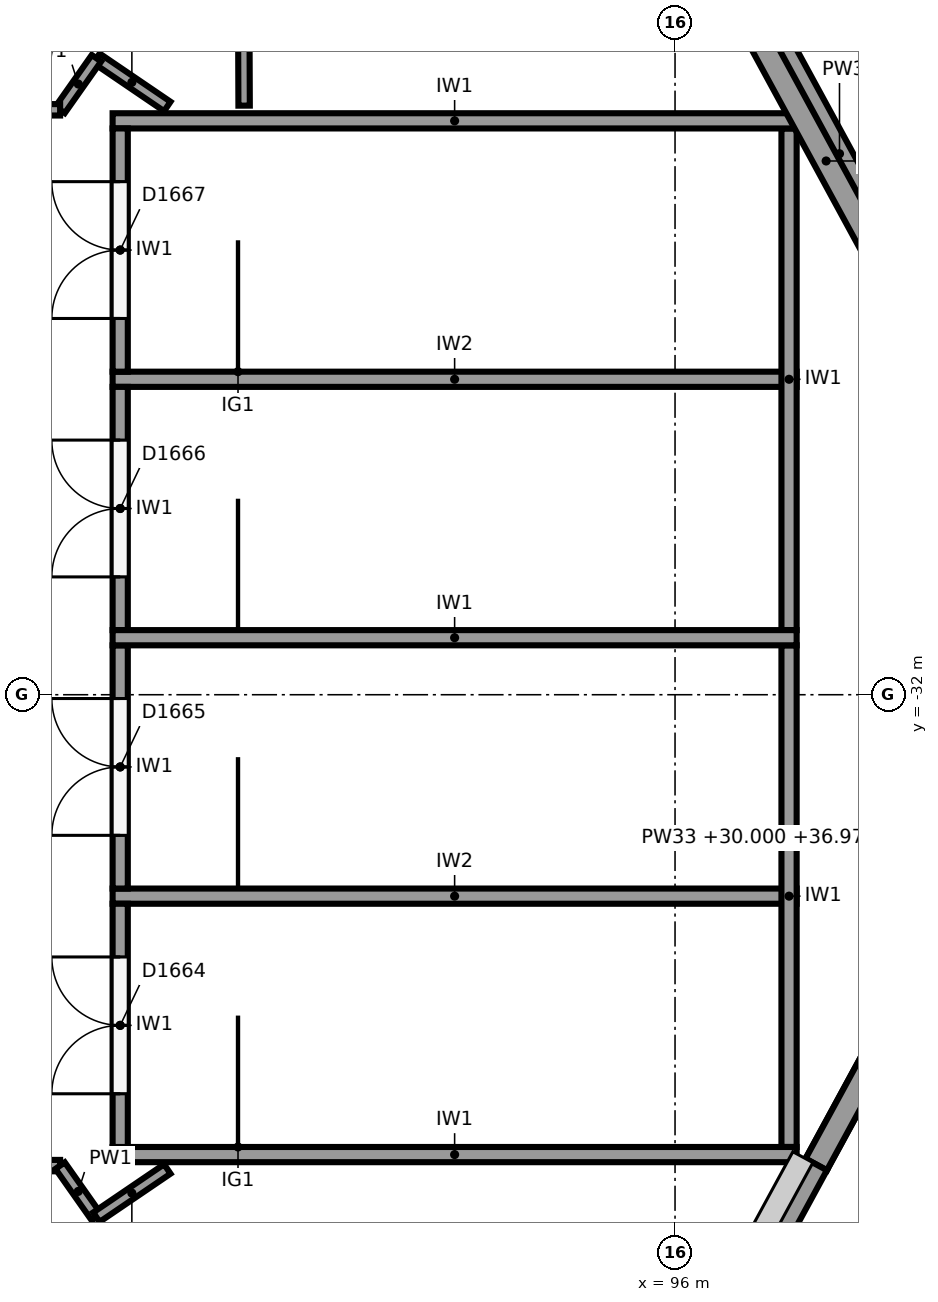
"""IFC4 building model, lengths in metres.
Left out: names, types, materials, properties, quantities, classifications, styles, units other than length and angle.
Written with IfcOpenShell. Run it as: python <this file> out.ifc"""

import sys

from ifc_helpers import new_model, si_unit, direction, frame, frame_2d, origin, place, context, subcontext, project, spatial, polyline, rectangle, outline, extrude, element, fill, save


model = new_model("IFC4")
c1 = context("Model", 3, precision=1e-05, world=origin(), true_north=direction((0.0, 1.0)))
c2 = subcontext(c1, "Body", "Model", "MODEL_VIEW")
j1 = project(units=[si_unit("LENGTHUNIT", "METRE"), si_unit("PLANEANGLEUNIT", "RADIAN")], contexts=[c1])
p1 = place(None, origin())
s1 = spatial("IfcSite", under=j1, at=p1, CompositionType="ELEMENT")
p2 = place(p1, origin())
s2 = spatial("IfcBuilding", under=s1, at=p2, CompositionType="ELEMENT")
p3 = place(p2, frame((0.0, 0.0, 24.0)))
s3 = spatial("IfcBuildingStorey", under=s2, at=p3, CompositionType="ELEMENT", Elevation=24.0)
p4 = place(p3, frame((101.337, -31.785, 0.0), z_axis=(0.0, 0.0, 1.0), x_axis=(-0.477865020076, -0.878433277255, 0.0)))
e1 = element("IfcWall", 1, at=p4, inside=s3, PredefinedType="SOLIDWALL", context=c2, shape_type="SweptSolid", body=[
    extrude(rectangle(XDim=7.28, YDim=0.32, at=frame_2d((3.64, 0.0))), origin(), (0.0, 0.0, 1.0), 6.0),
])
p5 = place(p4, frame((1.13, 0.0, 1.0)))
e2 = element("IfcOpeningElement", 2, at=p5, cuts=e1, PredefinedType="OPENING", context=c2, shape_type="SweptSolid", body=[
    extrude(rectangle(XDim=0.9, YDim=3.25, at=frame_2d((0.45, 1.625))), frame((0.0, 0.17, 0.0), z_axis=(0.0, -1.0, 0.0), x_axis=(1.0, 0.0, 0.0)), (0.0, 0.0, 1.0), 0.34),
])
p6 = place(p3, frame((101.337, -31.785, 6.0), z_axis=(0.0, 0.0, 1.0), x_axis=(-0.477865020076, -0.878433277255, 0.0)))
e3 = element("IfcWall", 3, at=p6, inside=s3, PredefinedType="SOLIDWALL", context=c2, shape_type="SweptSolid", body=[
    extrude(outline(polyline([(0.0, 0.0), (7.28, 0.0), (7.28, 6.972), (0.0, 10.451), (0.0, 0.0)])), frame((0.0, 0.16, 0.0), z_axis=(0.0, -1.0, 0.0), x_axis=(1.0, 0.0, 0.0)), (0.0, 0.0, 1.0), 0.32),
])
p7 = place(p6, frame((1.13, 0.0, 1.6)))
e4 = element("IfcOpeningElement", 4, at=p7, cuts=e3, PredefinedType="OPENING", context=c2, shape_type="SweptSolid", body=[
    extrude(rectangle(XDim=0.9, YDim=3.0, at=frame_2d((0.45, 1.5))), frame((0.0, 0.17, 0.0), z_axis=(0.0, -1.0, 0.0), x_axis=(1.0, 0.0, 0.0)), (0.0, 0.0, 1.0), 0.34),
])
p8 = place(p3, frame((97.858, -38.18, 5.65), z_axis=(0.0, 0.0, 1.0), x_axis=(-0.477871109227, -0.878429964747, 0.0)))
e5 = element("IfcWall", 5, at=p8, inside=s3, PredefinedType="SOLIDWALL", context=c2, shape_type="SweptSolid", body=[
    extrude(outline(polyline([(0.0, 0.0), (6.0, 0.0), (6.0, 4.455), (0.0, 7.322), (0.0, 0.0)])), frame((0.0, 0.16, 0.0), z_axis=(0.0, -1.0, 0.0), x_axis=(1.0, 0.0, 0.0)), (0.0, 0.0, 1.0), 0.32),
])
p9 = place(p3, frame((94.815, -19.145, 0.0), z_axis=(0.0, 0.0, 1.0), x_axis=(0.477867771117, -0.878431780691, 0.0)))
e6 = element("IfcWall", 6, at=p9, inside=s3, PredefinedType="SOLIDWALL", context=c2, shape_type="SweptSolid", body=[
    extrude(rectangle(XDim=13.28, YDim=0.32, at=frame_2d((6.64, 0.0))), origin(), (0.0, 0.0, 1.0), 6.0),
])
p10 = place(p9, frame((0.75, 0.0, 1.0)))
e7 = element("IfcOpeningElement", 7, at=p10, cuts=e6, PredefinedType="OPENING", context=c2, shape_type="SweptSolid", body=[
    extrude(rectangle(XDim=0.9, YDim=3.25, at=frame_2d((0.45, 1.625))), frame((0.0, 0.17, 0.0), z_axis=(0.0, -1.0, 0.0), x_axis=(1.0, 0.0, 0.0)), (0.0, 0.0, 1.0), 0.34),
])
p11 = place(p9, frame((2.85, 0.0, 1.0)))
e8 = element("IfcOpeningElement", 8, at=p11, cuts=e6, PredefinedType="OPENING", context=c2, shape_type="SweptSolid", body=[
    extrude(rectangle(XDim=0.9, YDim=3.25, at=frame_2d((0.45, 1.625))), frame((0.0, 0.17, 0.0), z_axis=(0.0, -1.0, 0.0), x_axis=(1.0, 0.0, 0.0)), (0.0, 0.0, 1.0), 0.34),
])
p12 = place(p9, frame((11.25, 0.0, 1.0)))
e9 = element("IfcOpeningElement", 9, at=p12, cuts=e6, PredefinedType="OPENING", context=c2, shape_type="SweptSolid", body=[
    extrude(rectangle(XDim=0.9, YDim=3.25, at=frame_2d((0.45, 1.625))), frame((0.0, 0.17, 0.0), z_axis=(0.0, -1.0, 0.0), x_axis=(1.0, 0.0, 0.0)), (0.0, 0.0, 1.0), 0.34),
])
p13 = place(p3, frame((94.991, -19.05, 6.0), z_axis=(0.0, 0.0, 1.0), x_axis=(0.477867771117, -0.878431780691, 0.0)))
e10 = element("IfcWall", 10, at=p13, inside=s3, PredefinedType="SOLIDWALL", context=c2, shape_type="SweptSolid", body=[
    extrude(outline(polyline([(0.0, 0.0), (13.28, 0.0), (13.28, 10.451), (0.0, 4.105), (0.0, 0.0)])), frame((0.0, 0.16, 0.0), z_axis=(0.0, -1.0, 0.0), x_axis=(1.0, 0.0, 0.0)), (0.0, 0.0, 1.0), 0.32),
])
p14 = place(p13, frame((2.85, 0.0, 1.6)))
e11 = element("IfcOpeningElement", 11, at=p14, cuts=e10, PredefinedType="OPENING", context=c2, shape_type="SweptSolid", body=[
    extrude(rectangle(XDim=0.9, YDim=3.0, at=frame_2d((0.45, 1.5))), frame((0.0, 0.17, 0.0), z_axis=(0.0, -1.0, 0.0), x_axis=(1.0, 0.0, 0.0)), (0.0, 0.0, 1.0), 0.34),
])
p15 = place(p13, frame((11.25, 0.0, 1.6)))
e12 = element("IfcOpeningElement", 12, at=p15, cuts=e10, PredefinedType="OPENING", context=c2, shape_type="SweptSolid", body=[
    extrude(rectangle(XDim=0.9, YDim=3.0, at=frame_2d((0.45, 1.5))), frame((0.0, 0.17, 0.0), z_axis=(0.0, -1.0, 0.0), x_axis=(1.0, 0.0, 0.0)), (0.0, 0.0, 1.0), 0.34),
])
for number, where, z_axis, x_axis in (
    (13, (97.6, -38.05, 0.0), (0.0, 0.0, 1.0), (-1.0, 0.0, 0.0)),
    (14, (97.6, -31.25, 0.0), (0.0, 0.0, 1.0), (-1.0, 0.0, 0.0)),
    (15, (97.6, -24.45, 0.0), (0.0, 0.0, 1.0), (-1.0, 0.0, 0.0)),
):
    element("IfcWall", number, at=place(p3, frame(where, z_axis=z_axis, x_axis=x_axis)), inside=s3, PredefinedType="SHEAR", context=c2, shape_type="SweptSolid", body=[
        extrude(rectangle(XDim=9.0, YDim=0.2, at=frame_2d((4.5, 0.0))), origin(), (0.0, 0.0, 1.0), 5.75),
    ])
for number, where, z_axis, x_axis in (
    (16, (97.5, -37.95, 0.0), (0.0, 0.0, 1.0), (0.0, 1.0, 0.0)),
    (17, (97.5, -31.15, 0.0), (0.0, 0.0, 1.0), (0.0, 1.0, 0.0)),
):
    element("IfcWall", number, at=place(p3, frame(where, z_axis=z_axis, x_axis=x_axis)), inside=s3, PredefinedType="SHEAR", context=c2, shape_type="SweptSolid", body=[
        extrude(rectangle(XDim=6.6, YDim=0.2, at=frame_2d((3.3, 0.0))), origin(), (0.0, 0.0, 1.0), 5.75),
    ])
for number, where, z_axis, x_axis in (
    (18, (97.6, -34.65, 0.0), (0.0, 0.0, 1.0), (-1.0, 0.0, 0.0)),
    (19, (97.6, -27.85, 0.0), (0.0, 0.0, 1.0), (-1.0, 0.0, 0.0)),
):
    element("IfcWall", number, at=place(p3, frame(where, z_axis=z_axis, x_axis=x_axis)), inside=s3, PredefinedType="SHEAR", context=c2, shape_type="SweptSolid", body=[
        extrude(rectangle(XDim=9.0, YDim=0.2, at=frame_2d((4.5, 0.0))), origin(), (0.0, 0.0, 1.0), 5.75),
    ])
p16 = place(p3, frame((88.7, -37.95, 0.0), z_axis=(0.0, 0.0, 1.0), x_axis=(0.0, 1.0, 0.0)))
e20 = element("IfcWall", 20, at=p16, inside=s3, PredefinedType="SHEAR", context=c2, shape_type="SweptSolid", body=[
    extrude(rectangle(XDim=3.2, YDim=0.2, at=frame_2d((1.6, 0.0))), origin(), (0.0, 0.0, 1.0), 5.75),
])
p17 = place(p16, frame((0.7, 0.0, 0.0)))
e21 = element("IfcOpeningElement", 21, at=p17, cuts=e20, PredefinedType="OPENING", context=c2, shape_type="SweptSolid", body=[
    extrude(rectangle(XDim=1.8, YDim=2.1, at=frame_2d((0.9, 1.05))), frame((0.0, 0.11, 0.0), z_axis=(0.0, -1.0, 0.0), x_axis=(1.0, 0.0, 0.0)), (0.0, 0.0, 1.0), 0.22),
])
p18 = place(p3, frame((88.7, -34.55, 0.0), z_axis=(0.0, 0.0, 1.0), x_axis=(0.0, 1.0, 0.0)))
e22 = element("IfcWall", 22, at=p18, inside=s3, PredefinedType="SHEAR", context=c2, shape_type="SweptSolid", body=[
    extrude(rectangle(XDim=3.2, YDim=0.2, at=frame_2d((1.6, 0.0))), origin(), (0.0, 0.0, 1.0), 5.75),
])
p19 = place(p18, frame((0.7, 0.0, 0.0)))
e23 = element("IfcOpeningElement", 23, at=p19, cuts=e22, PredefinedType="OPENING", context=c2, shape_type="SweptSolid", body=[
    extrude(rectangle(XDim=1.8, YDim=2.1, at=frame_2d((0.9, 1.05))), frame((0.0, 0.11, 0.0), z_axis=(0.0, -1.0, 0.0), x_axis=(1.0, 0.0, 0.0)), (0.0, 0.0, 1.0), 0.22),
])
p20 = place(p3, frame((88.7, -31.15, 0.0), z_axis=(0.0, 0.0, 1.0), x_axis=(0.0, 1.0, 0.0)))
e24 = element("IfcWall", 24, at=p20, inside=s3, PredefinedType="SHEAR", context=c2, shape_type="SweptSolid", body=[
    extrude(rectangle(XDim=3.2, YDim=0.2, at=frame_2d((1.6, 0.0))), origin(), (0.0, 0.0, 1.0), 5.75),
])
p21 = place(p20, frame((0.7, 0.0, 0.0)))
e25 = element("IfcOpeningElement", 25, at=p21, cuts=e24, PredefinedType="OPENING", context=c2, shape_type="SweptSolid", body=[
    extrude(rectangle(XDim=1.8, YDim=2.1, at=frame_2d((0.9, 1.05))), frame((0.0, 0.11, 0.0), z_axis=(0.0, -1.0, 0.0), x_axis=(1.0, 0.0, 0.0)), (0.0, 0.0, 1.0), 0.22),
])
p22 = place(p3, frame((88.7, -27.75, 0.0), z_axis=(0.0, 0.0, 1.0), x_axis=(0.0, 1.0, 0.0)))
e26 = element("IfcWall", 26, at=p22, inside=s3, PredefinedType="SHEAR", context=c2, shape_type="SweptSolid", body=[
    extrude(rectangle(XDim=3.2, YDim=0.2, at=frame_2d((1.6, 0.0))), origin(), (0.0, 0.0, 1.0), 5.75),
])
p23 = place(p22, frame((0.7, 0.0, 0.0)))
e27 = element("IfcOpeningElement", 27, at=p23, cuts=e26, PredefinedType="OPENING", context=c2, shape_type="SweptSolid", body=[
    extrude(rectangle(XDim=1.8, YDim=2.1, at=frame_2d((0.9, 1.05))), frame((0.0, 0.11, 0.0), z_axis=(0.0, -1.0, 0.0), x_axis=(1.0, 0.0, 0.0)), (0.0, 0.0, 1.0), 0.22),
])
p24 = place(p3, frame((90.33, -24.25, 0.0), z_axis=(0.0, 0.0, 1.0), x_axis=(-0.003805253437, 0.999992759997, 0.0)))
e28 = element("IfcWall", 28, at=p24, inside=s3, PredefinedType="PARTITIONING", context=c2, shape_type="SweptSolid", body=[
    extrude(rectangle(XDim=5.261, YDim=0.15, at=frame_2d((2.63, 0.0))), origin(), (0.0, 0.0, 1.0), 5.4),
])
p25 = place(p24, frame((2.2, 0.0, 0.0)))
e29 = element("IfcOpeningElement", 29, at=p25, cuts=e28, PredefinedType="OPENING", context=c2, shape_type="SweptSolid", body=[
    extrude(rectangle(XDim=1.0, YDim=2.1, at=frame_2d((0.5, 1.05))), frame((0.0, 0.085, 0.0), z_axis=(0.0, -1.0, 0.0), x_axis=(1.0, 0.0, 0.0)), (0.0, 0.0, 1.0), 0.17),
])
p26 = place(p3, frame((82.427, -38.195, 0.0), z_axis=(0.0, 0.0, 1.0), x_axis=(1.0, 0.0, 0.0)))
e30 = element("IfcWall", 30, at=p26, inside=s3, PredefinedType="PARTITIONING", context=c2, shape_type="SweptSolid", body=[
    extrude(rectangle(XDim=5.482, YDim=0.15, at=frame_2d((2.741, 0.0))), origin(), (0.0, 0.0, 1.0), 5.4),
])
p27 = place(p26, frame((1.85, 0.0, 0.0)))
e31 = element("IfcOpeningElement", 31, at=p27, cuts=e30, PredefinedType="OPENING", context=c2, shape_type="SweptSolid", body=[
    extrude(rectangle(XDim=1.8, YDim=2.1, at=frame_2d((0.9, 1.05))), frame((0.0, 0.085, 0.0), z_axis=(0.0, -1.0, 0.0), x_axis=(1.0, 0.0, 0.0)), (0.0, 0.0, 1.0), 0.17),
])
p28 = place(p3, frame((87.909, -38.195, 0.0), z_axis=(0.0, 0.0, 1.0), x_axis=(0.575573582652, -0.81774999294, 0.0)))
e32 = element("IfcWall", 32, at=p28, inside=s3, PredefinedType="PARTITIONING", context=c2, shape_type="SweptSolid", body=[
    extrude(rectangle(XDim=0.83, YDim=0.15, at=frame_2d((0.415, 0.0))), origin(), (0.0, 0.0, 1.0), 5.4),
])
p29 = place(p3, frame((88.387, -38.874, 0.0), z_axis=(0.0, 0.0, 1.0), x_axis=(0.827055308354, 0.562120553728, 0.0)))
e33 = element("IfcWall", 33, at=p29, inside=s3, PredefinedType="PARTITIONING", context=c2, shape_type="SweptSolid", body=[
    extrude(rectangle(XDim=1.128, YDim=0.15, at=frame_2d((0.564, 0.0))), origin(), (0.0, 0.0, 1.0), 5.4),
])
p30 = place(p3, frame((89.32, -24.26, 0.0), z_axis=(0.0, 0.0, 1.0), x_axis=(-0.826918447352, 0.562321866398, 0.0)))
e34 = element("IfcWall", 34, at=p30, inside=s3, PredefinedType="PARTITIONING", context=c2, shape_type="SweptSolid", body=[
    extrude(rectangle(XDim=1.127, YDim=0.15, at=frame_2d((0.564, 0.0))), origin(), (0.0, 0.0, 1.0), 5.4),
])
p31 = place(p3, frame((88.387, -23.626, 0.0), z_axis=(0.0, 0.0, 1.0), x_axis=(-0.575908835733, -0.81751392216, 0.0)))
e35 = element("IfcWall", 35, at=p31, inside=s3, PredefinedType="PARTITIONING", context=c2, shape_type="SweptSolid", body=[
    extrude(rectangle(XDim=0.83, YDim=0.15, at=frame_2d((0.415, 0.0))), origin(), (0.0, 0.0, 1.0), 5.4),
])
p32 = place(p3, frame((87.909, -24.305, 0.0), z_axis=(0.0, 0.0, 1.0), x_axis=(-1.0, 0.0, 0.0)))
e36 = element("IfcWall", 36, at=p32, inside=s3, PredefinedType="PARTITIONING", context=c2, shape_type="SweptSolid", body=[
    extrude(rectangle(XDim=3.704, YDim=0.15, at=frame_2d((1.852, 0.0))), origin(), (0.0, 0.0, 1.0), 5.4),
])
p33 = place(p32, frame((0.65, 0.0, 0.0)))
e37 = element("IfcOpeningElement", 37, at=p33, cuts=e36, PredefinedType="OPENING", context=c2, shape_type="SweptSolid", body=[
    extrude(rectangle(XDim=1.8, YDim=2.1, at=frame_2d((0.9, 1.05))), frame((0.0, 0.085, 0.0), z_axis=(0.0, -1.0, 0.0), x_axis=(1.0, 0.0, 0.0)), (0.0, 0.0, 1.0), 0.17),
])
p34 = place(p17, origin())
e38 = element("IfcDoor", 38, at=p34, inside=s3, OperationType="DOUBLE_DOOR_SINGLE_SWING", PredefinedType="DOOR", context=c2, shape_type="SweptSolid", body=[
    extrude(rectangle(XDim=1.8, YDim=2.1, at=frame_2d((0.9, 1.05))), frame((0.0, 0.025, 0.0), z_axis=(0.0, -1.0, 0.0), x_axis=(1.0, 0.0, 0.0)), (0.0, 0.0, 1.0), 0.05),
])
fill(e21, e38)
p35 = place(p19, origin())
e39 = element("IfcDoor", 39, at=p35, inside=s3, OperationType="DOUBLE_DOOR_SINGLE_SWING", PredefinedType="DOOR", context=c2, shape_type="SweptSolid", body=[
    extrude(rectangle(XDim=1.8, YDim=2.1, at=frame_2d((0.9, 1.05))), frame((0.0, 0.025, 0.0), z_axis=(0.0, -1.0, 0.0), x_axis=(1.0, 0.0, 0.0)), (0.0, 0.0, 1.0), 0.05),
])
fill(e23, e39)
p36 = place(p21, origin())
e40 = element("IfcDoor", 40, at=p36, inside=s3, OperationType="DOUBLE_DOOR_SINGLE_SWING", PredefinedType="DOOR", context=c2, shape_type="SweptSolid", body=[
    extrude(rectangle(XDim=1.8, YDim=2.1, at=frame_2d((0.9, 1.05))), frame((0.0, 0.025, 0.0), z_axis=(0.0, -1.0, 0.0), x_axis=(1.0, 0.0, 0.0)), (0.0, 0.0, 1.0), 0.05),
])
fill(e25, e40)
p37 = place(p23, origin())
e41 = element("IfcDoor", 41, at=p37, inside=s3, OperationType="DOUBLE_DOOR_SINGLE_SWING", PredefinedType="DOOR", context=c2, shape_type="SweptSolid", body=[
    extrude(rectangle(XDim=1.8, YDim=2.1, at=frame_2d((0.9, 1.05))), frame((0.0, 0.025, 0.0), z_axis=(0.0, -1.0, 0.0), x_axis=(1.0, 0.0, 0.0)), (0.0, 0.0, 1.0), 0.05),
])
fill(e27, e41)
save(model, sys.argv[1])
